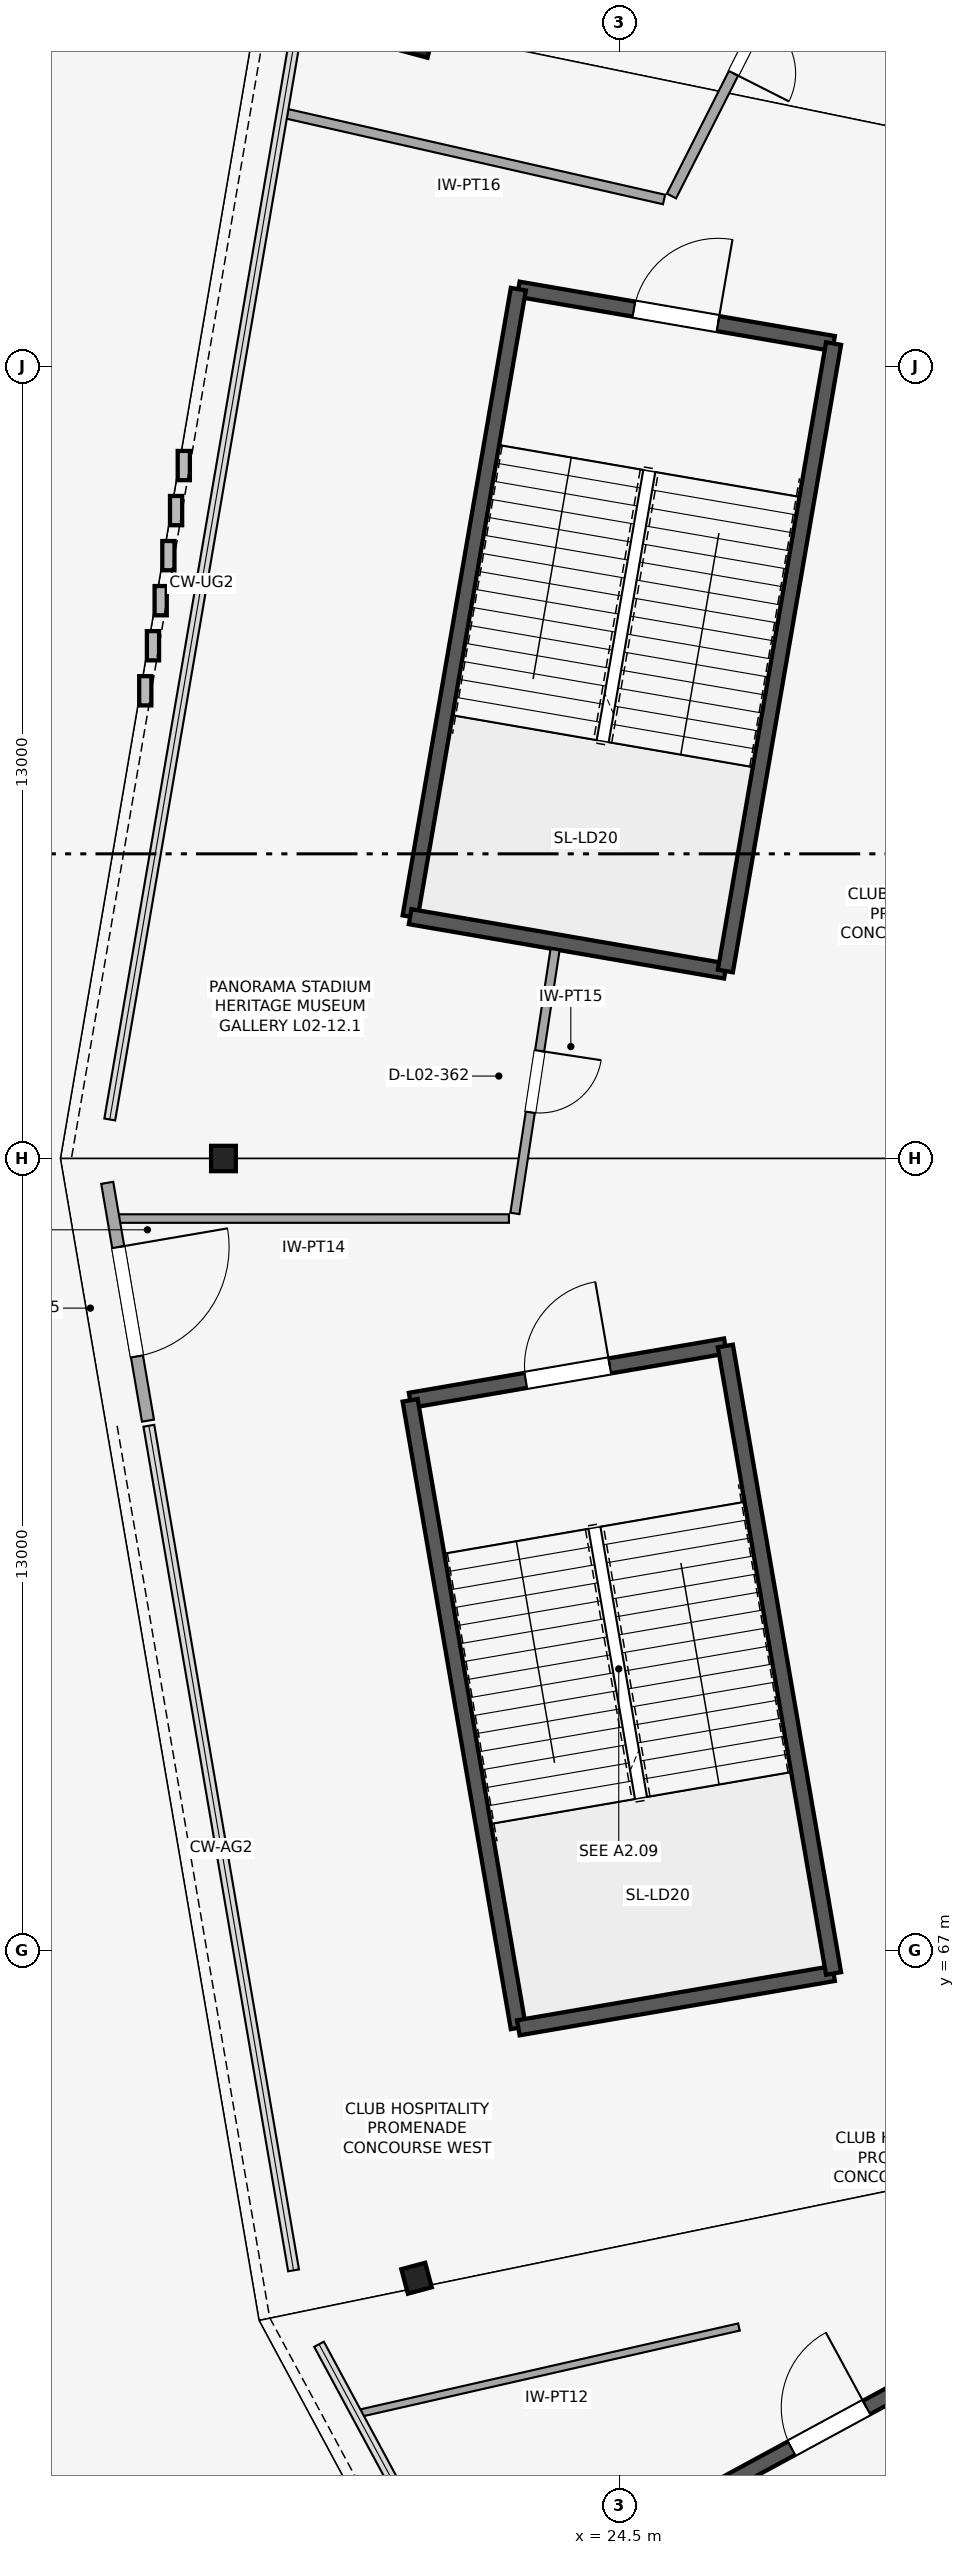
"""IFC4 building model, lengths in metres.
Left out: names, types, materials, properties, quantities, classifications, styles, units other than length and angle.
Written with IfcOpenShell. Run it as: python <this file> out.ifc"""

import sys

from ifc_helpers import new_model, si_unit, direction, frame, frame_2d, origin, origin_2d, place, context, subcontext, project, spatial, rectangle, hollow_circle, i_section, extrude, element, fill, save


model = new_model("IFC4")
c1 = context("Model", 3, precision=1e-05, world=origin(), true_north=direction((0.0, 1.0)))
c2 = subcontext(c1, "Body", "Model", "MODEL_VIEW")
j1 = project(units=[si_unit("LENGTHUNIT", "METRE"), si_unit("PLANEANGLEUNIT", "RADIAN")], contexts=[c1])
p1 = place(None, origin())
s1 = spatial("IfcSite", under=j1, at=p1, CompositionType="ELEMENT")
p2 = place(p1, origin())
s2 = spatial("IfcBuilding", under=s1, at=p2, CompositionType="ELEMENT")
p3 = place(p2, frame((0.0, 0.0, 10.6)))
s3 = spatial("IfcBuildingStorey", under=s2, at=p3, CompositionType="ELEMENT", Elevation=10.6)
p4 = place(p3, frame((21.169, 98.376, 0.0), z_axis=(0.0, 0.0, 1.0), x_axis=(-0.965925826289, 0.258819045103, 0.0)))
e1 = element("IfcColumn", 1, at=p4, inside=s3, PredefinedType="COLUMN", context=c2, shape_type="SweptSolid", body=[
    extrude(hollow_circle(Radius=0.254, WallThickness=0.025, at=origin_2d()), origin(), (0.0, 0.0, 1.0), 5.0),
])
p5 = place(p3, frame((18.0, 80.0, -0.28), z_axis=(0.0, 0.0, 1.0), x_axis=(-1.0, 0.0, 0.0)))
e2 = element("IfcColumn", 2, at=p5, inside=s3, PredefinedType="PILASTER", context=c2, shape_type="SweptSolid", body=[
    extrude(i_section(OverallWidth=0.406, OverallDepth=0.416, WebThickness=0.024, FlangeThickness=0.039, FilletRadius=0.015, at=origin_2d()), origin(), (0.0, 0.0, 1.0), 5.28),
])
p6 = place(p3, frame((21.169, 61.624, 0.0), z_axis=(0.0, 0.0, 1.0), x_axis=(-0.965925826289, -0.258819045103, 0.0)))
e3 = element("IfcColumn", 3, at=p6, inside=s3, PredefinedType="PILASTER", context=c2, shape_type="SweptSolid", body=[
    extrude(i_section(OverallWidth=0.406, OverallDepth=0.416, WebThickness=0.024, FlangeThickness=0.039, FilletRadius=0.015, at=origin_2d()), origin(), (0.0, 0.0, 1.0), 5.0),
])
p7 = place(p3, frame((26.238, 76.923, 0.0), z_axis=(0.0, 0.0, 1.0), x_axis=(-0.985457162135, -0.16992404655, 0.0)))
e4 = element("IfcWall", 4, at=p7, inside=s3, PredefinedType="SHEAR", context=c2, shape_type="SweptSolid", body=[
    extrude(rectangle(XDim=5.25, YDim=0.25, at=frame_2d((2.625, 0.0))), origin(), (0.0, 0.0, 1.0), 4.72),
])
p8 = place(p7, frame((1.925, 0.0, 0.0)))
e5 = element("IfcOpeningElement", 5, at=p8, cuts=e4, PredefinedType="OPENING", context=c2, shape_type="SweptSolid", body=[
    extrude(rectangle(XDim=1.4, YDim=2.2, at=frame_2d((0.7, 1.1))), frame((0.0, 0.135, 0.0), z_axis=(0.0, -1.0, 0.0), x_axis=(1.0, 0.0, 0.0)), (0.0, 0.0, 1.0), 0.27),
])
p9 = place(p3, frame((21.064, 76.031, 0.0), z_axis=(0.0, 0.0, 1.0), x_axis=(0.169938992676, -0.985454584833, 0.0)))
e6 = element("IfcWall", 6, at=p9, inside=s3, PredefinedType="SHEAR", context=c2, shape_type="SweptSolid", body=[
    extrude(rectangle(XDim=10.45, YDim=0.25, at=frame_2d((5.225, 0.0))), origin(), (0.0, 0.0, 1.0), 4.72),
])
p10 = place(p3, frame((22.84, 65.733, 0.0), z_axis=(0.0, 0.0, 1.0), x_axis=(0.985457162135, 0.16992404655, 0.0)))
e7 = element("IfcWall", 7, at=p10, inside=s3, PredefinedType="SHEAR", context=c2, shape_type="SweptSolid", body=[
    extrude(rectangle(XDim=5.25, YDim=0.25, at=frame_2d((2.625, 0.0))), origin(), (0.0, 0.0, 1.0), 4.72),
])
p11 = place(p3, frame((28.013, 66.625, 0.0), z_axis=(0.0, 0.0, 1.0), x_axis=(-0.169938992676, 0.985454584833, 0.0)))
e8 = element("IfcWall", 8, at=p11, inside=s3, PredefinedType="SHEAR", context=c2, shape_type="SweptSolid", body=[
    extrude(rectangle(XDim=10.45, YDim=0.25, at=frame_2d((5.225, 0.0))), origin(), (0.0, 0.0, 1.0), 4.72),
])
p12 = place(p3, frame((30.246, 60.42, 0.0), z_axis=(0.0, 0.0, 1.0), x_axis=(-0.878961487093, -0.47689275965, 0.0)))
e9 = element("IfcWall", 9, at=p12, inside=s3, PredefinedType="SHEAR", context=c2, shape_type="SweptSolid", body=[
    extrude(rectangle(XDim=5.25, YDim=0.25, at=frame_2d((2.625, 0.0))), origin(), (0.0, 0.0, 1.0), 4.72),
])
p13 = place(p12, frame((1.925, 0.0, 0.0)))
e10 = element("IfcOpeningElement", 10, at=p13, cuts=e9, PredefinedType="OPENING", context=c2, shape_type="SweptSolid", body=[
    extrude(rectangle(XDim=1.4, YDim=2.2, at=frame_2d((0.7, 1.1))), frame((0.0, 0.135, 0.0), z_axis=(0.0, -1.0, 0.0), x_axis=(1.0, 0.0, 0.0)), (0.0, 0.0, 1.0), 0.27),
])
p14 = place(p3, frame((28.013, 93.375, 0.0), z_axis=(0.0, 0.0, 1.0), x_axis=(-0.985457162135, 0.16992404655, 0.0)))
e11 = element("IfcWall", 11, at=p14, inside=s3, PredefinedType="SHEAR", context=c2, shape_type="SweptSolid", body=[
    extrude(rectangle(XDim=5.25, YDim=0.25, at=frame_2d((2.625, 0.0))), origin(), (0.0, 0.0, 1.0), 4.72),
])
p15 = place(p14, frame((1.925, 0.0, 0.0)))
e12 = element("IfcOpeningElement", 12, at=p15, cuts=e11, PredefinedType="OPENING", context=c2, shape_type="SweptSolid", body=[
    extrude(rectangle(XDim=1.4, YDim=2.2, at=frame_2d((0.7, 1.1))), frame((0.0, 0.135, 0.0), z_axis=(0.0, -1.0, 0.0), x_axis=(1.0, 0.0, 0.0)), (0.0, 0.0, 1.0), 0.27),
])
p16 = place(p3, frame((22.84, 94.267, 0.0), z_axis=(0.0, 0.0, 1.0), x_axis=(-0.169938992676, -0.985454584833, 0.0)))
e13 = element("IfcWall", 13, at=p16, inside=s3, PredefinedType="SHEAR", context=c2, shape_type="SweptSolid", body=[
    extrude(rectangle(XDim=10.45, YDim=0.25, at=frame_2d((5.225, 0.0))), origin(), (0.0, 0.0, 1.0), 4.72),
])
p17 = place(p3, frame((21.064, 83.969, 0.0), z_axis=(0.0, 0.0, 1.0), x_axis=(0.985458504796, -0.169916259745, 0.0)))
e14 = element("IfcWall", 14, at=p17, inside=s3, PredefinedType="SHEAR", context=c2, shape_type="SweptSolid", body=[
    extrude(rectangle(XDim=5.25, YDim=0.25, at=frame_2d((2.625, 0.0))), origin(), (0.0, 0.0, 1.0), 4.72),
])
p18 = place(p3, frame((26.238, 83.077, 0.0), z_axis=(0.0, 0.0, 1.0), x_axis=(0.16991630471, 0.985458497043, 0.0)))
e15 = element("IfcWall", 15, at=p18, inside=s3, PredefinedType="SHEAR", context=c2, shape_type="SweptSolid", body=[
    extrude(rectangle(XDim=10.45, YDim=0.25, at=frame_2d((5.225, 0.0))), origin(), (0.0, 0.0, 1.0), 4.72),
])
p19 = place(p3, frame((27.849, 100.732, 0.0), z_axis=(0.0, 0.0, 1.0), x_axis=(-0.451304453126, -0.892370041288, 0.0)))
e16 = element("IfcWall", 16, at=p19, inside=s3, PredefinedType="PARTITIONING", context=c2, shape_type="SweptSolid", body=[
    extrude(rectangle(XDim=5.532, YDim=0.17, at=frame_2d((2.766, 0.0))), origin(), (0.0, 0.0, 1.0), 3.47),
])
p20 = place(p19, frame((2.256, 0.0, 0.0)))
e17 = element("IfcOpeningElement", 17, at=p20, cuts=e16, PredefinedType="OPENING", context=c2, shape_type="SweptSolid", body=[
    extrude(rectangle(XDim=1.02, YDim=2.24, at=frame_2d((0.51, 1.12))), frame((0.0, 0.095, 0.0), z_axis=(0.0, -1.0, 0.0), x_axis=(1.0, 0.0, 0.0)), (0.0, 0.0, 1.0), 0.19),
])
p21 = place(p3, frame((25.231, 95.739, 0.0), z_axis=(0.0, 0.0, 1.0), x_axis=(-0.975146090514, 0.221562862762, 0.0)))
e18 = element("IfcWall", 18, at=p21, inside=s3, PredefinedType="PARTITIONING", context=c2, shape_type="SweptSolid", body=[
    extrude(rectangle(XDim=6.342, YDim=0.16, at=frame_2d((3.171, 0.0))), origin(), (0.0, 0.0, 1.0), 3.47),
])
p22 = place(p3, frame((23.442, 83.427, 0.0), z_axis=(0.0, 0.0, 1.0), x_axis=(-0.150565219496, -0.988600078231, 0.0)))
e19 = element("IfcWall", 19, at=p22, inside=s3, PredefinedType="PARTITIONING", context=c2, shape_type="SweptSolid", body=[
    extrude(rectangle(XDim=4.378, YDim=0.15, at=frame_2d((2.189, 0.0))), origin(), (0.0, 0.0, 1.0), 3.47),
])
p23 = place(p22, frame((1.679, 0.0, 0.0)))
e20 = element("IfcOpeningElement", 20, at=p23, cuts=e19, PredefinedType="OPENING", context=c2, shape_type="SweptSolid", body=[
    extrude(rectangle(XDim=1.02, YDim=2.38, at=frame_2d((0.51, 1.19))), frame((0.0, 0.085, 0.0), z_axis=(0.0, -1.0, 0.0), x_axis=(1.0, 0.0, 0.0)), (0.0, 0.0, 1.0), 0.17),
])
p24 = place(p3, frame((22.685, 79.015, 0.0), z_axis=(0.0, 0.0, 1.0), x_axis=(-0.999999999274, -3.8103948e-05, 0.0)))
e21 = element("IfcWall", 21, at=p24, inside=s3, PredefinedType="PARTITIONING", context=c2, shape_type="SweptSolid", body=[
    extrude(rectangle(XDim=6.407, YDim=0.14, at=frame_2d((3.204, 0.0))), origin(), (0.0, 0.0, 1.0), 3.47),
])
p25 = place(p3, frame((26.46, 60.823, 0.0), z_axis=(0.0, 0.0, 1.0), x_axis=(-0.975090159218, -0.221808884844, 0.0)))
e22 = element("IfcWall", 22, at=p25, inside=s3, PredefinedType="PARTITIONING", context=c2, shape_type="SweptSolid", body=[
    extrude(rectangle(XDim=6.35, YDim=0.12, at=frame_2d((3.175, 0.0))), origin(), (0.0, 0.0, 1.0), 3.47),
])
p26 = place(p3, frame((16.093, 79.601, 0.0), z_axis=(0.0, 0.0, 1.0), x_axis=(0.168866275192, -0.985638970974, 0.0)))
e23 = element("IfcWall", 23, at=p26, inside=s3, PredefinedType="PARTITIONING", context=c2, shape_type="SweptSolid", body=[
    extrude(rectangle(XDim=3.96, YDim=0.2, at=frame_2d((1.98, 0.0))), origin(), (0.0, 0.0, 1.0), 3.47),
])
p27 = place(p26, frame((1.07, 0.0, 0.0)))
e24 = element("IfcOpeningElement", 24, at=p27, cuts=e23, PredefinedType="OPENING", context=c2, shape_type="SweptSolid", body=[
    extrude(rectangle(XDim=1.82, YDim=2.38, at=frame_2d((0.91, 1.19))), frame((0.0, 0.11, 0.0), z_axis=(0.0, -1.0, 0.0), x_axis=(1.0, 0.0, 0.0)), (0.0, 0.0, 1.0), 0.22),
])
p28 = place(p8, frame((1.4, 0.0, 0.0), z_axis=(0.0, 0.0, 1.0), x_axis=(-1.0, 0.0, 0.0)))
e25 = element("IfcDoor", 25, at=p28, inside=s3, OperationType="SINGLE_SWING_RIGHT", PredefinedType="DOOR", context=c2, shape_type="SweptSolid", body=[
    extrude(rectangle(XDim=1.4, YDim=2.2, at=frame_2d((0.7, 1.1))), frame((0.0, 0.025, 0.0), z_axis=(0.0, -1.0, 0.0), x_axis=(1.0, 0.0, 0.0)), (0.0, 0.0, 1.0), 0.05),
])
fill(e5, e25)
p29 = place(p13, frame((1.4, 0.0, 0.0), z_axis=(0.0, 0.0, 1.0), x_axis=(-1.0, 0.0, 0.0)))
e26 = element("IfcDoor", 26, at=p29, inside=s3, OperationType="SINGLE_SWING_RIGHT", PredefinedType="DOOR", context=c2, shape_type="SweptSolid", body=[
    extrude(rectangle(XDim=1.4, YDim=2.2, at=frame_2d((0.7, 1.1))), frame((0.0, 0.025, 0.0), z_axis=(0.0, -1.0, 0.0), x_axis=(1.0, 0.0, 0.0)), (0.0, 0.0, 1.0), 0.05),
])
fill(e10, e26)
p30 = place(p15, frame((1.4, 0.0, 0.0), z_axis=(0.0, 0.0, 1.0), x_axis=(-1.0, 0.0, 0.0)))
e27 = element("IfcDoor", 27, at=p30, inside=s3, OperationType="SINGLE_SWING_RIGHT", PredefinedType="DOOR", context=c2, shape_type="SweptSolid", body=[
    extrude(rectangle(XDim=1.4, YDim=2.2, at=frame_2d((0.7, 1.1))), frame((0.0, 0.025, 0.0), z_axis=(0.0, -1.0, 0.0), x_axis=(1.0, 0.0, 0.0)), (0.0, 0.0, 1.0), 0.05),
])
fill(e12, e27)
p31 = place(p20, origin())
e28 = element("IfcDoor", 28, at=p31, inside=s3, OperationType="SINGLE_SWING_RIGHT", PredefinedType="DOOR", context=c2, shape_type="SweptSolid", body=[
    extrude(rectangle(XDim=1.02, YDim=2.24, at=frame_2d((0.51, 1.12))), frame((0.0, 0.025, 0.0), z_axis=(0.0, -1.0, 0.0), x_axis=(1.0, 0.0, 0.0)), (0.0, 0.0, 1.0), 0.05),
])
fill(e17, e28)
p32 = place(p23, origin())
e29 = element("IfcDoor", 29, at=p32, inside=s3, OperationType="SINGLE_SWING_LEFT", PredefinedType="DOOR", context=c2, shape_type="SweptSolid", body=[
    extrude(rectangle(XDim=1.02, YDim=2.38, at=frame_2d((0.51, 1.19))), frame((0.0, 0.025, 0.0), z_axis=(0.0, -1.0, 0.0), x_axis=(1.0, 0.0, 0.0)), (0.0, 0.0, 1.0), 0.05),
])
fill(e20, e29)
p33 = place(p27, origin())
e30 = element("IfcDoor", 30, at=p33, inside=s3, OperationType="SINGLE_SWING_LEFT", PredefinedType="DOOR", context=c2, shape_type="SweptSolid", body=[
    extrude(rectangle(XDim=1.82, YDim=2.38, at=frame_2d((0.91, 1.19))), frame((0.0, 0.025, 0.0), z_axis=(0.0, -1.0, 0.0), x_axis=(1.0, 0.0, 0.0)), (0.0, 0.0, 1.0), 0.05),
])
fill(e24, e30)
save(model, sys.argv[1])
